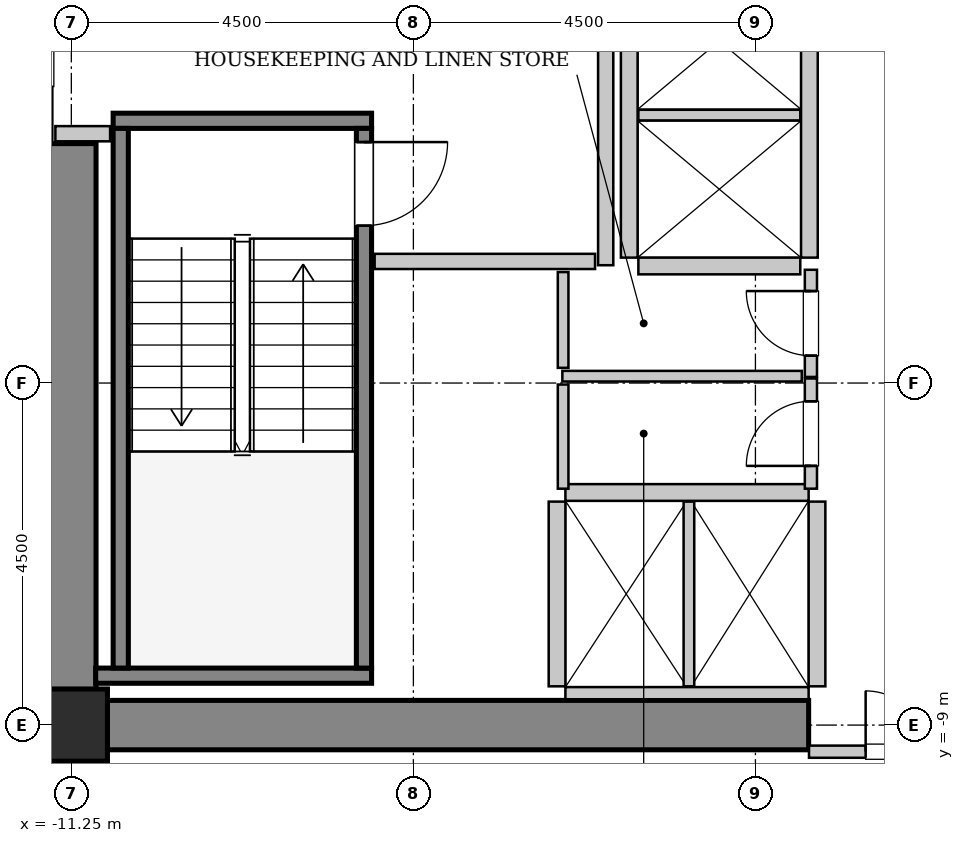
"""IFC4 building model, lengths in metres.
Left out: names, types, materials, properties, quantities, classifications, styles, units other than length and angle.
Written with IfcOpenShell. Run it as: python <this file> out.ifc"""

import sys

from ifc_helpers import new_model, si_unit, direction, frame, frame_2d, origin, origin_2d, place, context, subcontext, project, spatial, rectangle, hollow_rectangle, extrude, source, transform, mapped, element, fill, save


model = new_model("IFC4")
c1 = context("Model", 3, precision=1e-05, world=origin(), true_north=direction((0.0, 1.0)))
c2 = subcontext(c1, "Body", "Model", "MODEL_VIEW")
j1 = project(units=[si_unit("LENGTHUNIT", "METRE"), si_unit("PLANEANGLEUNIT", "RADIAN")], contexts=[c1])
p1 = place(None, origin())
s1 = spatial("IfcSite", under=j1, at=p1, CompositionType="ELEMENT")
p2 = place(p1, origin())
s2 = spatial("IfcBuilding", under=s1, at=p2, CompositionType="ELEMENT")
p3 = place(p2, frame((0.0, 0.0, 59.6)))
s3 = spatial("IfcBuildingStorey", under=s2, at=p3, CompositionType="ELEMENT", Elevation=59.6)
m1 = source(origin(), c2, "Body", "SweptSolid", [
    extrude(rectangle(XDim=10.025, YDim=0.65, at=frame_2d((5.012, 0.0))), origin(), (0.0, 0.0, 1.0), 3.8),
])
p4 = place(p3, frame((-11.575, -9.0, 0.0), z_axis=(0.0, 0.0, 1.0), x_axis=(1.0, 0.0, 0.0)))
e1 = element("IfcWall", 1, at=p4, inside=s3, PredefinedType="SHEAR", context=c2, shape_type="MappedRepresentation", body=[
    mapped(m1, transform((0.0, 0.0, 0.0), x_axis=(1.0, 0.0, 0.0), y_axis=(0.0, 1.0, 0.0), z_axis=(0.0, 0.0, 1.0), scale=1.0)),
])
m2 = source(origin(), c2, "Body", "SweptSolid", [
    extrude(rectangle(XDim=7.325, YDim=0.65, at=frame_2d((3.663, 0.0))), origin(), (0.0, 0.0, 1.0), 3.8),
])
p5 = place(p3, frame((-11.25, -8.675, 0.0), z_axis=(0.0, 0.0, 1.0), x_axis=(0.0, 1.0, 0.0)))
e2 = element("IfcWall", 2, at=p5, inside=s3, PredefinedType="SHEAR", context=c2, shape_type="MappedRepresentation", body=[
    mapped(m2, transform((0.0, 0.0, 0.0), x_axis=(1.0, 0.0, 0.0), y_axis=(0.0, 1.0, 0.0), z_axis=(0.0, 0.0, 1.0), scale=1.0)),
])
m3 = source(origin(), c2, "Body", "SweptSolid", [
    extrude(hollow_rectangle(XDim=0.95, YDim=0.95, WallThickness=0.045, InnerFilletRadius=0.045, OuterFilletRadius=0.09, at=origin_2d()), origin(), (0.0, 0.0, 1.0), 3.8),
])
p6 = place(p3, frame((-11.25, -9.0, 0.0), z_axis=(0.0, 0.0, 1.0), x_axis=(1.0, 0.0, 0.0)))
e3 = element("IfcColumn", 3, at=p6, inside=s3, PredefinedType="COLUMN", context=c2, shape_type="MappedRepresentation", body=[
    mapped(m3, transform((0.0, 0.0, 0.0), x_axis=(1.0, 0.0, 0.0), y_axis=(0.0, 1.0, 0.0), z_axis=(0.0, 0.0, 1.0), scale=1.0)),
])
m4 = source(origin(), c2, "Body", "SweptSolid", [
    extrude(rectangle(XDim=3.4, YDim=0.2, at=frame_2d((1.7, 0.0))), origin(), (0.0, 0.0, 1.0), 3.8),
])
p7 = place(p3, frame((-10.7, -1.05, 0.0), z_axis=(0.0, 0.0, 1.0), x_axis=(1.0, 0.0, 0.0)))
e4 = element("IfcWall", 4, at=p7, inside=s3, PredefinedType="SOLIDWALL", context=c2, shape_type="MappedRepresentation", body=[
    mapped(m4, transform((0.0, 0.0, 0.0), x_axis=(1.0, 0.0, 0.0), y_axis=(0.0, 1.0, 0.0), z_axis=(0.0, 0.0, 1.0), scale=1.0)),
])
m5 = source(origin(), c2, "Body", "SweptSolid", [
    extrude(rectangle(XDim=3.63, YDim=0.2, at=frame_2d((1.815, 0.0))), origin(), (0.0, 0.0, 1.0), 3.8),
])
p8 = place(p3, frame((-10.93, -8.35, 0.0), z_axis=(0.0, 0.0, 1.0), x_axis=(1.0, 0.0, 0.0)))
e5 = element("IfcWall", 5, at=p8, inside=s3, PredefinedType="SOLIDWALL", context=c2, shape_type="MappedRepresentation", body=[
    mapped(m5, transform((0.0, 0.0, 0.0), x_axis=(1.0, 0.0, 0.0), y_axis=(0.0, 1.0, 0.0), z_axis=(0.0, 0.0, 1.0), scale=1.0)),
])
m6 = source(origin(), c2, "Body", "SweptSolid", [
    extrude(rectangle(XDim=7.1, YDim=0.2, at=frame_2d((3.55, 0.0))), origin(), (0.0, 0.0, 1.0), 3.8),
])
p9 = place(p3, frame((-10.6, -1.15, 0.0), z_axis=(0.0, 0.0, 1.0), x_axis=(0.0, -1.0, 0.0)))
e6 = element("IfcWall", 6, at=p9, inside=s3, PredefinedType="SOLIDWALL", context=c2, shape_type="MappedRepresentation", body=[
    mapped(m6, transform((0.0, 0.0, 0.0), x_axis=(1.0, 0.0, 0.0), y_axis=(0.0, 1.0, 0.0), z_axis=(0.0, 0.0, 1.0), scale=1.0)),
])
p10 = place(p3, frame((-7.4, -1.15, 0.0), z_axis=(0.0, 0.0, 1.0), x_axis=(0.0, -1.0, 0.0)))
e7 = element("IfcWall", 7, at=p10, inside=s3, PredefinedType="SOLIDWALL", context=c2, shape_type="MappedRepresentation", body=[
    mapped(m6, transform((0.0, 0.0, 0.0), x_axis=(1.0, 0.0, 0.0), y_axis=(0.0, 1.0, 0.0), z_axis=(0.0, 0.0, 1.0), scale=1.0)),
])
p11 = place(p10, frame((0.18, 0.0, 0.0)))
e8 = element("IfcOpeningElement", 8, at=p11, cuts=e7, PredefinedType="OPENING", context=c2, shape_type="SweptSolid", body=[
    extrude(rectangle(XDim=1.1, YDim=2.15, at=frame_2d((0.55, 1.075))), frame((0.0, 0.11, 0.0), z_axis=(0.0, -1.0, 0.0), x_axis=(1.0, 0.0, 0.0)), (0.0, 0.0, 1.0), 0.22),
])
m7 = source(origin(), c2, "Body", "SweptSolid", [
    extrude(rectangle(XDim=3.2, YDim=0.22, at=frame_2d((1.6, 0.0))), origin(), (0.0, 0.0, 1.0), 3.535),
])
p12 = place(p3, frame((-1.55, -5.94, 0.0), z_axis=(0.0, 0.0, 1.0), x_axis=(-1.0, 0.0, 0.0)))
e9 = element("IfcWall", 9, at=p12, inside=s3, PredefinedType="SOLIDWALL", context=c2, shape_type="MappedRepresentation", body=[
    mapped(m7, transform((0.0, 0.0, 0.0), x_axis=(1.0, 0.0, 0.0), y_axis=(0.0, 1.0, 0.0), z_axis=(0.0, 0.0, 1.0), scale=1.0)),
])
m8 = source(origin(), c2, "Body", "SweptSolid", [
    extrude(rectangle(XDim=3.2, YDim=0.16, at=frame_2d((1.6, 0.0))), origin(), (0.0, 0.0, 1.0), 2.425),
])
p13 = place(p3, frame((-4.75, -8.58, 0.0), z_axis=(0.0, 0.0, 1.0), x_axis=(1.0, 0.0, 0.0)))
e10 = element("IfcWall", 10, at=p13, inside=s3, PredefinedType="PARTITIONING", context=c2, shape_type="MappedRepresentation", body=[
    mapped(m8, transform((0.0, 0.0, 0.0), x_axis=(1.0, 0.0, 0.0), y_axis=(0.0, 1.0, 0.0), z_axis=(0.0, 0.0, 1.0), scale=1.0)),
])
m9 = source(origin(), c2, "Body", "SweptSolid", [
    extrude(rectangle(XDim=2.43, YDim=0.22, at=frame_2d((1.215, 0.0))), origin(), (0.0, 0.0, 1.0), 3.535),
])
p14 = place(p3, frame((-4.86, -6.06, 0.0), z_axis=(0.0, 0.0, 1.0), x_axis=(0.0, -1.0, 0.0)))
e11 = element("IfcWall", 11, at=p14, inside=s3, PredefinedType="SOLIDWALL", context=c2, shape_type="MappedRepresentation", body=[
    mapped(m9, transform((0.0, 0.0, 0.0), x_axis=(1.0, 0.0, 0.0), y_axis=(0.0, 1.0, 0.0), z_axis=(0.0, 0.0, 1.0), scale=1.0)),
])
m10 = source(origin(), c2, "Body", "SweptSolid", [
    extrude(rectangle(XDim=2.43, YDim=0.14, at=frame_2d((1.215, 0.0))), origin(), (0.0, 0.0, 1.0), 3.535),
])
p15 = place(p3, frame((-3.125, -8.49, 0.0), z_axis=(0.0, 0.0, 1.0), x_axis=(0.0, 1.0, 0.0)))
e12 = element("IfcWall", 12, at=p15, inside=s3, PredefinedType="PARTITIONING", context=c2, shape_type="MappedRepresentation", body=[
    mapped(m10, transform((0.0, 0.0, 0.0), x_axis=(1.0, 0.0, 0.0), y_axis=(0.0, 1.0, 0.0), z_axis=(0.0, 0.0, 1.0), scale=1.0)),
])
p16 = place(p3, frame((-1.44, -8.49, 0.0), z_axis=(0.0, 0.0, 1.0), x_axis=(0.0, 1.0, 0.0)))
e13 = element("IfcWall", 13, at=p16, inside=s3, PredefinedType="SOLIDWALL", context=c2, shape_type="MappedRepresentation", body=[
    mapped(m9, transform((0.0, 0.0, 0.0), x_axis=(1.0, 0.0, 0.0), y_axis=(0.0, 1.0, 0.0), z_axis=(0.0, 0.0, 1.0), scale=1.0)),
])
m11 = source(origin(), c2, "Body", "SweptSolid", [
    extrude(rectangle(XDim=5.7, YDim=0.22, at=frame_2d((2.85, 0.0))), origin(), (0.0, 0.0, 1.0), 3.535),
])
for number, where, z_axis, x_axis in (
    (14, (-1.54, -2.85, 0.0), (0.0, 0.0, 1.0), (0.0, 1.0, 0.0)),
    (15, (-3.91, 2.85, 0.0), (0.0, 0.0, 1.0), (0.0, -1.0, 0.0)),
):
    element("IfcWall", number, at=place(p3, frame(where, z_axis=z_axis, x_axis=x_axis)), inside=s3, PredefinedType="SOLIDWALL", context=c2, shape_type="MappedRepresentation", body=[
        mapped(m11, transform((0.0, 0.0, 0.0), x_axis=(1.0, 0.0, 0.0), y_axis=(0.0, 1.0, 0.0), z_axis=(0.0, 0.0, 1.0), scale=1.0)),
    ])
m12 = source(origin(), c2, "Body", "SweptSolid", [
    extrude(rectangle(XDim=2.13, YDim=0.22, at=frame_2d((1.065, 0.0))), origin(), (0.0, 0.0, 1.0), 3.535),
])
p17 = place(p3, frame((-3.79, -2.96, 0.0), z_axis=(0.0, 0.0, 1.0), x_axis=(1.0, 0.0, 0.0)))
e16 = element("IfcWall", 16, at=p17, inside=s3, PredefinedType="SOLIDWALL", context=c2, shape_type="MappedRepresentation", body=[
    mapped(m12, transform((0.0, 0.0, 0.0), x_axis=(1.0, 0.0, 0.0), y_axis=(0.0, 1.0, 0.0), z_axis=(0.0, 0.0, 1.0), scale=1.0)),
])
m13 = source(origin(), c2, "Body", "SweptSolid", [
    extrude(rectangle(XDim=2.13, YDim=0.14, at=frame_2d((1.065, 0.0))), origin(), (0.0, 0.0, 1.0), 3.535),
])
p18 = place(p3, frame((-3.79, -0.975, 0.0), z_axis=(0.0, 0.0, 1.0), x_axis=(1.0, 0.0, 0.0)))
e17 = element("IfcWall", 17, at=p18, inside=s3, PredefinedType="PARTITIONING", context=c2, shape_type="MappedRepresentation", body=[
    mapped(m13, transform((0.0, 0.0, 0.0), x_axis=(1.0, 0.0, 0.0), y_axis=(0.0, 1.0, 0.0), z_axis=(0.0, 0.0, 1.0), scale=1.0)),
])
m14 = source(origin(), c2, "Body", "SweptSolid", [
    extrude(rectangle(XDim=5.9, YDim=0.2, at=frame_2d((2.95, 0.0))), origin(), (0.0, 0.0, 1.0), 3.535),
])
p19 = place(p3, frame((-4.22, -2.95, 0.0), z_axis=(0.0, 0.0, 1.0), x_axis=(0.0, 1.0, 0.0)))
e18 = element("IfcWall", 18, at=p19, inside=s3, PredefinedType="PARTITIONING", context=c2, shape_type="MappedRepresentation", body=[
    mapped(m14, transform((0.0, 0.0, 0.0), x_axis=(1.0, 0.0, 0.0), y_axis=(0.0, 1.0, 0.0), z_axis=(0.0, 0.0, 1.0), scale=1.0)),
])
m15 = source(origin(), c2, "Body", "SweptSolid", [
    extrude(rectangle(XDim=2.9, YDim=0.2, at=frame_2d((1.45, 0.0))), origin(), (0.0, 0.0, 1.0), 3.535),
])
p20 = place(p3, frame((-7.26, -2.9, 0.0), z_axis=(0.0, 0.0, 1.0), x_axis=(1.0, 0.0, 0.0)))
e19 = element("IfcWall", 19, at=p20, inside=s3, PredefinedType="PARTITIONING", context=c2, shape_type="MappedRepresentation", body=[
    mapped(m15, transform((0.0, 0.0, 0.0), x_axis=(1.0, 0.0, 0.0), y_axis=(0.0, 1.0, 0.0), z_axis=(0.0, 0.0, 1.0), scale=1.0)),
])
m16 = source(origin(), c2, "Body", "SweptSolid", [
    extrude(rectangle(XDim=0.72, YDim=0.2, at=frame_2d((0.36, 0.0))), origin(), (0.0, 0.0, 1.0), 3.535),
])
p21 = place(p3, frame((-11.46, -1.22, 0.0), z_axis=(0.0, 0.0, 1.0), x_axis=(1.0, 0.0, 0.0)))
e20 = element("IfcWall", 20, at=p21, inside=s3, PredefinedType="PARTITIONING", context=c2, shape_type="MappedRepresentation", body=[
    mapped(m16, transform((0.0, 0.0, 0.0), x_axis=(1.0, 0.0, 0.0), y_axis=(0.0, 1.0, 0.0), z_axis=(0.0, 0.0, 1.0), scale=1.0)),
])
m17 = source(origin(), c2, "Body", "SweptSolid", [
    extrude(rectangle(XDim=3.09, YDim=0.16, at=frame_2d((1.545, 0.0))), origin(), (0.0, 0.0, 1.0), 2.425),
])
p22 = place(p3, frame((-1.545, -9.35, 0.0), z_axis=(0.0, 0.0, 1.0), x_axis=(1.0, 0.0, 0.0)))
e21 = element("IfcWall", 21, at=p22, inside=s3, PredefinedType="PARTITIONING", context=c2, shape_type="MappedRepresentation", body=[
    mapped(m17, transform((0.0, 0.0, 0.0), x_axis=(1.0, 0.0, 0.0), y_axis=(0.0, 1.0, 0.0), z_axis=(0.0, 0.0, 1.0), scale=1.0)),
])
p23 = place(p22, frame((0.745, 0.0, 0.0)))
e22 = element("IfcOpeningElement", 22, at=p23, cuts=e21, PredefinedType="OPENING", context=c2, shape_type="SweptSolid", body=[
    extrude(rectangle(XDim=1.6, YDim=2.3, at=frame_2d((0.8, 1.15))), frame((0.0, 0.09, 0.0), z_axis=(0.0, -1.0, 0.0), x_axis=(1.0, 0.0, 0.0)), (0.0, 0.0, 1.0), 0.18),
])
m18 = source(origin(), c2, "Body", "SweptSolid", [
    extrude(rectangle(XDim=1.41, YDim=0.16, at=frame_2d((0.705, 0.0))), origin(), (0.0, 0.0, 1.0), 3.535),
])
p24 = place(p3, frame((-1.52, -4.42, 0.0), z_axis=(0.0, 0.0, 1.0), x_axis=(0.0, 1.0, 0.0)))
e23 = element("IfcWall", 23, at=p24, inside=s3, PredefinedType="PARTITIONING", context=c2, shape_type="MappedRepresentation", body=[
    mapped(m18, transform((0.0, 0.0, 0.0), x_axis=(1.0, 0.0, 0.0), y_axis=(0.0, 1.0, 0.0), z_axis=(0.0, 0.0, 1.0), scale=1.0)),
])
p25 = place(p24, frame((0.28, 0.0, 0.0)))
e24 = element("IfcOpeningElement", 24, at=p25, cuts=e23, PredefinedType="OPENING", context=c2, shape_type="SweptSolid", body=[
    extrude(rectangle(XDim=0.85, YDim=2.1, at=frame_2d((0.425, 1.05))), frame((0.0, 0.09, 0.0), z_axis=(0.0, -1.0, 0.0), x_axis=(1.0, 0.0, 0.0)), (0.0, 0.0, 1.0), 0.18),
])
m19 = source(origin(), c2, "Body", "SweptSolid", [
    extrude(rectangle(XDim=3.15, YDim=0.14, at=frame_2d((1.575, 0.0))), origin(), (0.0, 0.0, 1.0), 3.535),
])
p26 = place(p3, frame((-4.79, -4.41, 0.0), z_axis=(0.0, 0.0, 1.0), x_axis=(1.0, 0.0, 0.0)))
e25 = element("IfcWall", 25, at=p26, inside=s3, PredefinedType="PARTITIONING", context=c2, shape_type="MappedRepresentation", body=[
    mapped(m19, transform((0.0, 0.0, 0.0), x_axis=(1.0, 0.0, 0.0), y_axis=(0.0, 1.0, 0.0), z_axis=(0.0, 0.0, 1.0), scale=1.0)),
])
m20 = source(origin(), c2, "Body", "SweptSolid", [
    extrude(rectangle(XDim=1.26, YDim=0.14, at=frame_2d((0.63, 0.0))), origin(), (0.0, 0.0, 1.0), 3.535),
])
p27 = place(p3, frame((-4.78, -4.3, 0.0), z_axis=(0.0, 0.0, 1.0), x_axis=(0.0, 1.0, 0.0)))
e26 = element("IfcWall", 26, at=p27, inside=s3, PredefinedType="PARTITIONING", context=c2, shape_type="MappedRepresentation", body=[
    mapped(m20, transform((0.0, 0.0, 0.0), x_axis=(1.0, 0.0, 0.0), y_axis=(0.0, 1.0, 0.0), z_axis=(0.0, 0.0, 1.0), scale=1.0)),
])
m21 = source(origin(), c2, "Body", "SweptSolid", [
    extrude(rectangle(XDim=1.45, YDim=0.16, at=frame_2d((0.725, 0.0))), origin(), (0.0, 0.0, 1.0), 3.535),
])
p28 = place(p3, frame((-1.52, -5.89, 0.0), z_axis=(0.0, 0.0, 1.0), x_axis=(0.0, 1.0, 0.0)))
e27 = element("IfcWall", 27, at=p28, inside=s3, PredefinedType="PARTITIONING", context=c2, shape_type="MappedRepresentation", body=[
    mapped(m21, transform((0.0, 0.0, 0.0), x_axis=(1.0, 0.0, 0.0), y_axis=(0.0, 1.0, 0.0), z_axis=(0.0, 0.0, 1.0), scale=1.0)),
])
p29 = place(p28, frame((0.3, 0.0, 0.0)))
e28 = element("IfcOpeningElement", 28, at=p29, cuts=e27, PredefinedType="OPENING", context=c2, shape_type="SweptSolid", body=[
    extrude(rectangle(XDim=0.85, YDim=2.1, at=frame_2d((0.425, 1.05))), frame((0.0, 0.09, 0.0), z_axis=(0.0, -1.0, 0.0), x_axis=(1.0, 0.0, 0.0)), (0.0, 0.0, 1.0), 0.18),
])
m22 = source(origin(), c2, "Body", "SweptSolid", [
    extrude(rectangle(XDim=1.37, YDim=0.14, at=frame_2d((0.685, 0.0))), origin(), (0.0, 0.0, 1.0), 3.535),
])
p30 = place(p3, frame((-4.78, -5.89, 0.0), z_axis=(0.0, 0.0, 1.0), x_axis=(0.0, 1.0, 0.0)))
e29 = element("IfcWall", 29, at=p30, inside=s3, PredefinedType="PARTITIONING", context=c2, shape_type="MappedRepresentation", body=[
    mapped(m22, transform((0.0, 0.0, 0.0), x_axis=(1.0, 0.0, 0.0), y_axis=(0.0, 1.0, 0.0), z_axis=(0.0, 0.0, 1.0), scale=1.0)),
])
m23 = source(origin(), c2, "Body", "SweptSolid", [
    extrude(rectangle(XDim=1.1, YDim=2.15, at=frame_2d((0.55, 1.075))), frame((0.0, 0.025, 0.0), z_axis=(0.0, -1.0, 0.0), x_axis=(1.0, 0.0, 0.0)), (0.0, 0.0, 1.0), 0.05),
])
p31 = place(p11, origin())
e30 = element("IfcDoor", 30, at=p31, inside=s3, OperationType="SINGLE_SWING_LEFT", PredefinedType="DOOR", context=c2, shape_type="MappedRepresentation", body=[
    mapped(m23, transform((0.0, 0.0, 0.0), x_axis=(1.0, 0.0, 0.0), y_axis=(0.0, 1.0, 0.0), z_axis=(0.0, 0.0, 1.0), scale=1.0)),
])
fill(e8, e30)
m24 = source(origin(), c2, "Body", "SweptSolid", [
    extrude(rectangle(XDim=1.6, YDim=2.3, at=frame_2d((0.8, 1.15))), frame((0.0, 0.025, 0.0), z_axis=(0.0, -1.0, 0.0), x_axis=(1.0, 0.0, 0.0)), (0.0, 0.0, 1.0), 0.05),
])
p32 = place(p23, origin())
e31 = element("IfcDoor", 31, at=p32, inside=s3, OperationType="DOUBLE_DOOR_SINGLE_SWING", PredefinedType="DOOR", context=c2, shape_type="MappedRepresentation", body=[
    mapped(m24, transform((0.0, 0.0, 0.0), x_axis=(1.0, 0.0, 0.0), y_axis=(0.0, 1.0, 0.0), z_axis=(0.0, 0.0, 1.0), scale=1.0)),
])
fill(e22, e31)
m25 = source(origin(), c2, "Body", "SweptSolid", [
    extrude(rectangle(XDim=0.85, YDim=2.1, at=frame_2d((0.425, 1.05))), frame((0.0, 0.025, 0.0), z_axis=(0.0, -1.0, 0.0), x_axis=(1.0, 0.0, 0.0)), (0.0, 0.0, 1.0), 0.05),
])
p33 = place(p25, origin())
e32 = element("IfcDoor", 32, at=p33, inside=s3, OperationType="SINGLE_SWING_RIGHT", PredefinedType="DOOR", context=c2, shape_type="MappedRepresentation", body=[
    mapped(m25, transform((0.0, 0.0, 0.0), x_axis=(1.0, 0.0, 0.0), y_axis=(0.0, 1.0, 0.0), z_axis=(0.0, 0.0, 1.0), scale=1.0)),
])
fill(e24, e32)
p34 = place(p29, origin())
e33 = element("IfcDoor", 33, at=p34, inside=s3, OperationType="SINGLE_SWING_LEFT", PredefinedType="DOOR", context=c2, shape_type="MappedRepresentation", body=[
    mapped(m25, transform((0.0, 0.0, 0.0), x_axis=(1.0, 0.0, 0.0), y_axis=(0.0, 1.0, 0.0), z_axis=(0.0, 0.0, 1.0), scale=1.0)),
])
fill(e28, e33)
save(model, sys.argv[1])
